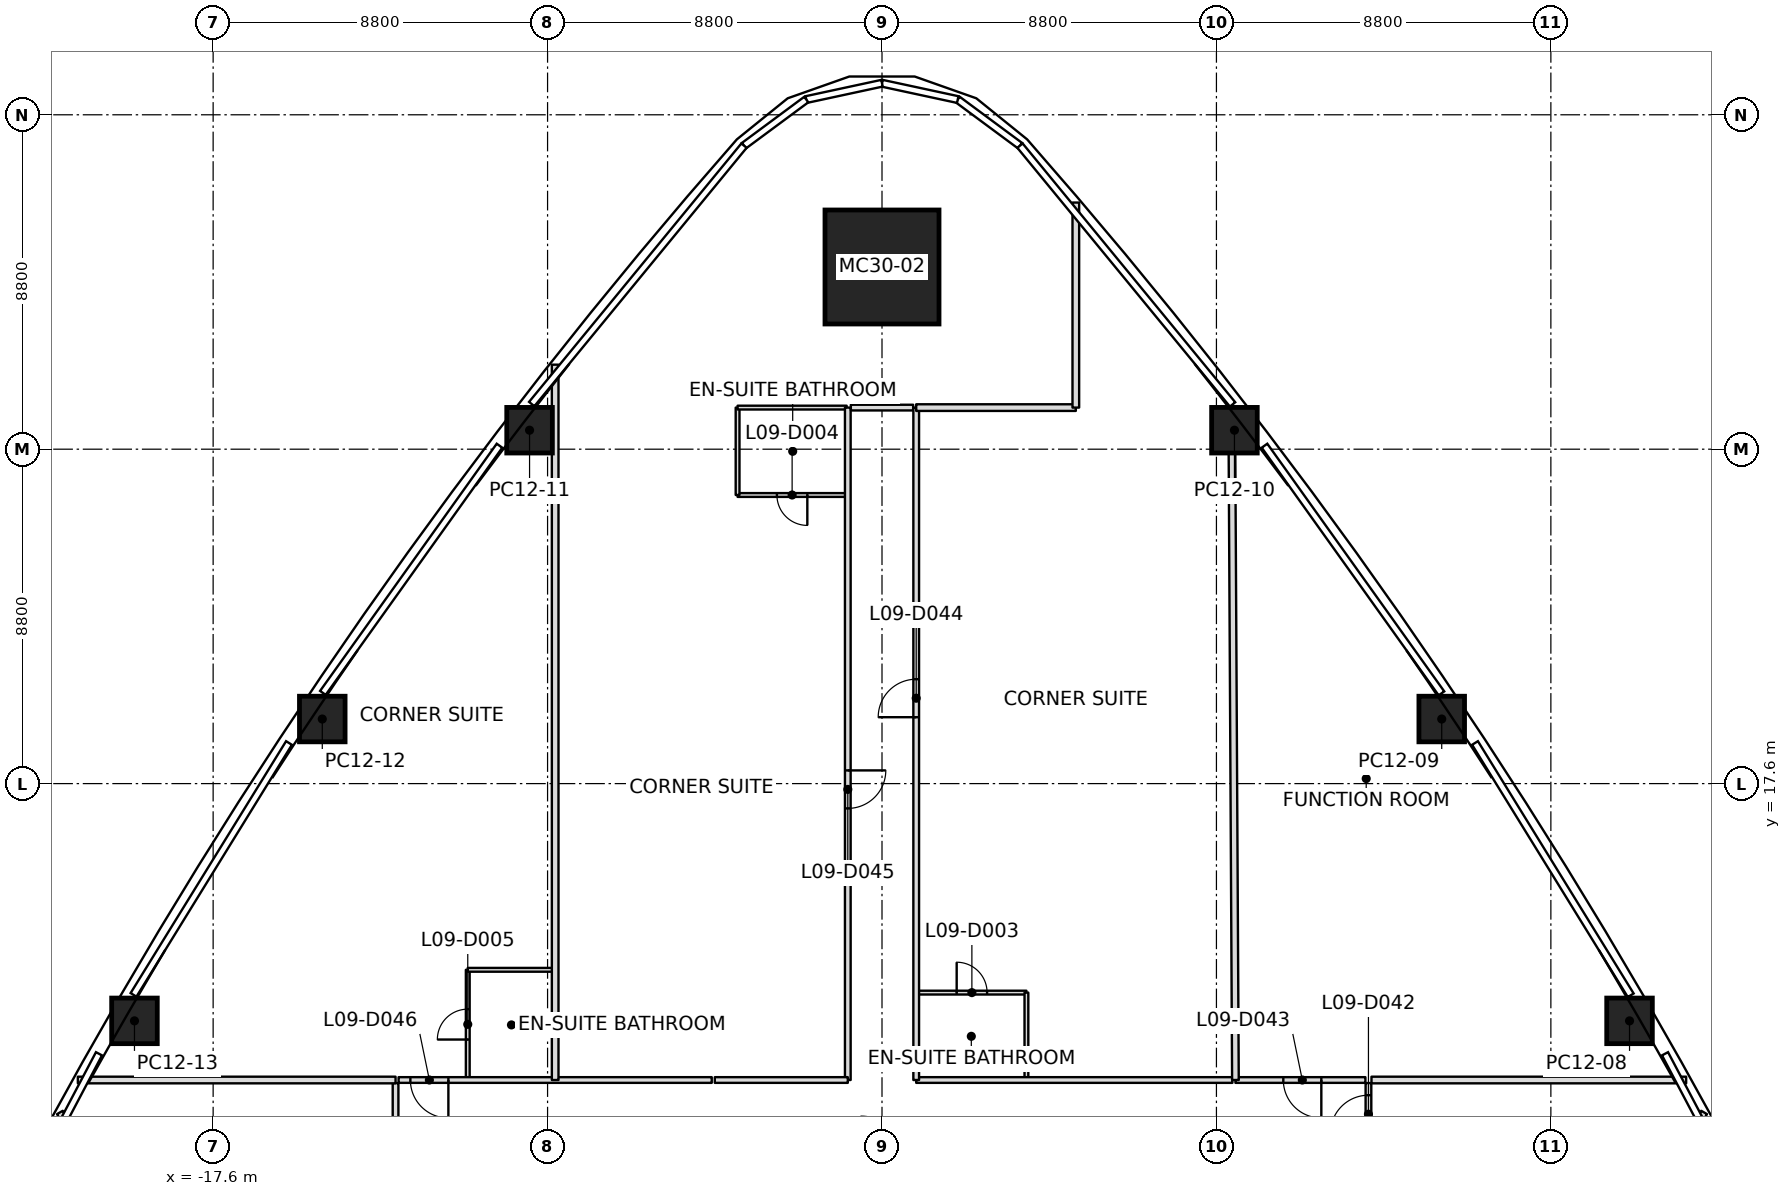
"""IFC4 building model, lengths in metres.
Left out: names, types, materials, properties, quantities, classifications, styles, units other than length and angle.
Written with IfcOpenShell. Run it as: python <this file> out.ifc"""

import sys

from ifc_helpers import new_model, si_unit, direction, frame, frame_2d, origin, origin_2d, place, context, subcontext, project, spatial, rectangle, extrude, element, fill, save


model = new_model("IFC4")
c1 = context("Model", 3, precision=1e-05, world=origin(), true_north=direction((0.0, 1.0)))
c2 = subcontext(c1, "Body", "Model", "MODEL_VIEW")
j1 = project(units=[si_unit("LENGTHUNIT", "METRE"), si_unit("PLANEANGLEUNIT", "RADIAN")], contexts=[c1])
p1 = place(None, origin())
s1 = spatial("IfcSite", under=j1, at=p1, CompositionType="ELEMENT")
p2 = place(p1, origin())
s2 = spatial("IfcBuilding", under=s1, at=p2, CompositionType="ELEMENT")
p3 = place(p2, frame((0.0, 0.0, 55.4)))
s3 = spatial("IfcBuildingStorey", under=s2, at=p3, CompositionType="ELEMENT", Elevation=55.4)
p4 = place(p3, frame((0.0, 31.195, 0.0), z_axis=(0.0, -0.035277579215, 0.999377552482), x_axis=(1.0, 0.0, 0.0)))
e1 = element("IfcColumn", 1, at=p4, inside=s3, PredefinedType="COLUMN", context=c2, shape_type="SweptSolid", body=[
    extrude(rectangle(XDim=3.0, YDim=3.0, at=origin_2d()), origin(), (0.0, 0.0, 1.0), 3.702),
])
p5 = place(p3, frame((19.67, 11.356, 0.0), z_axis=(-0.010688020009, -0.006201690622, 0.999923649716), x_axis=(-0.499971440741, 0.866041891424, 2.7221193e-05)))
e2 = element("IfcColumn", 2, at=p5, inside=s3, PredefinedType="COLUMN", context=c2, shape_type="SweptSolid", body=[
    extrude(rectangle(XDim=1.2, YDim=1.2, at=origin_2d()), origin(), (0.0, 0.0, 1.0), 3.7),
])
p6 = place(p3, frame((14.728, 19.299, 0.0), z_axis=(-0.005607671689, -0.014382028568, 0.999880848538), x_axis=(-0.555948898556, 0.831169491111, 0.008837377453)))
e3 = element("IfcColumn", 3, at=p6, inside=s3, PredefinedType="COLUMN", context=c2, shape_type="SweptSolid", body=[
    extrude(rectangle(XDim=1.2, YDim=1.2, at=origin_2d()), origin(), (0.0, 0.0, 1.0), 3.701),
])
for number, where, z_axis, x_axis in (
    (4, (9.274, 26.899, 0.0), (-0.0, -0.022, 1.0), (-0.61, 0.793, 0.018)),
    (5, (-9.274, 26.899, 0.0), (0.0, -0.022, 1.0), (0.61, 0.793, 0.018)),
):
    element("IfcColumn", number, at=place(p3, frame(where, z_axis=z_axis, x_axis=x_axis)), inside=s3, PredefinedType="COLUMN", context=c2, shape_type="SweptSolid", body=[
        extrude(rectangle(XDim=1.2, YDim=1.2, at=origin_2d()), origin(), (0.0, 0.0, 1.0), 3.701),
    ])
p7 = place(p3, frame((-14.728, 19.299, 0.0), z_axis=(0.005607671689, -0.014382028568, 0.999880848538), x_axis=(0.555948898556, 0.831169491111, 0.008837377453)))
e6 = element("IfcColumn", 6, at=p7, inside=s3, PredefinedType="COLUMN", context=c2, shape_type="SweptSolid", body=[
    extrude(rectangle(XDim=1.2, YDim=1.2, at=origin_2d()), origin(), (0.0, 0.0, 1.0), 3.701),
])
p8 = place(p3, frame((-19.67, 11.356, 0.0), z_axis=(0.010688020009, -0.006201690622, 0.999923649716), x_axis=(0.499971440741, 0.866041891424, 2.7221193e-05)))
e7 = element("IfcColumn", 7, at=p8, inside=s3, PredefinedType="COLUMN", context=c2, shape_type="SweptSolid", body=[
    extrude(rectangle(XDim=1.2, YDim=1.2, at=origin_2d()), origin(), (0.0, 0.0, 1.0), 3.7),
])
p9 = place(p3, frame((-21.632, 8.947, 0.0), z_axis=(0.0, 0.0, 1.0), x_axis=(0.499991586322, -0.866030261369, 0.0)))
e8 = element("IfcWall", 8, at=p9, inside=s3, PredefinedType="PARTITIONING", context=c2, shape_type="SweptSolid", body=[
    extrude(rectangle(XDim=3.115, YDim=0.175, at=frame_2d((1.557, 0.0))), origin(), (0.0, 0.0, 1.0), 2.784),
])
p10 = place(p3, frame((-12.8, 9.8, 0.0), z_axis=(0.0, 0.0, 1.0), x_axis=(-1.0, 0.0, 0.0)))
e9 = element("IfcWall", 9, at=p10, inside=s3, PredefinedType="PARTITIONING", context=c2, shape_type="SweptSolid", body=[
    extrude(rectangle(XDim=8.36, YDim=0.175, at=frame_2d((4.18, 0.0))), origin(), (0.0, 0.0, 1.0), 2.784),
])
p11 = place(p3, frame((-8.6, 9.8, 0.0), z_axis=(0.0, 0.0, 1.0), x_axis=(0.0, 1.0, 0.0)))
e10 = element("IfcWall", 10, at=p11, inside=s3, PredefinedType="PARTITIONING", context=c2, shape_type="SweptSolid", body=[
    extrude(rectangle(XDim=18.824, YDim=0.175, at=frame_2d((9.412, 0.0))), origin(), (0.0, 0.0, 1.0), 2.934),
])
p12 = place(p3, frame((0.9, 27.495, 0.0), z_axis=(0.0, 0.0, 1.0), x_axis=(1.0, 0.0, 0.0)))
e11 = element("IfcWall", 11, at=p12, inside=s3, PredefinedType="PARTITIONING", context=c2, shape_type="SweptSolid", body=[
    extrude(rectangle(XDim=4.2, YDim=0.175, at=frame_2d((2.1, 0.0))), origin(), (0.0, 0.0, 1.0), 3.0),
])
p13 = place(p3, frame((5.1, 27.495, 0.0), z_axis=(0.0, 0.0, 1.0), x_axis=(0.0, 1.0, 0.0)))
e12 = element("IfcWall", 12, at=p13, inside=s3, PredefinedType="PARTITIONING", context=c2, shape_type="SweptSolid", body=[
    extrude(rectangle(XDim=5.396, YDim=0.175, at=frame_2d((2.698, 0.0))), origin(), (0.0, 0.0, 1.0), 2.934),
])
p14 = place(p3, frame((9.203, 27.505, 0.0), z_axis=(0.0, 0.0, 1.0), x_axis=(0.005488058554, -0.999984940493, 0.0)))
e13 = element("IfcWall", 13, at=p14, inside=s3, PredefinedType="PARTITIONING", context=c2, shape_type="SweptSolid", body=[
    extrude(rectangle(XDim=17.705, YDim=0.175, at=frame_2d((8.853, 0.0))), origin(), (0.0, 0.0, 1.0), 2.947),
])
p15 = place(p3, frame((19.7, 5.6, 0.0), z_axis=(0.0, 0.0, 1.0), x_axis=(0.500059696094, 0.865990935485, 0.0)))
e14 = element("IfcWall", 14, at=p15, inside=s3, PredefinedType="PARTITIONING", context=c2, shape_type="SweptSolid", body=[
    extrude(rectangle(XDim=3.864, YDim=0.175, at=frame_2d((1.932, 0.0))), origin(), (0.0, 0.0, 1.0), 2.934),
])
p16 = place(p3, frame((12.88, 9.8, 0.0), z_axis=(0.0, 0.0, 1.0), x_axis=(1.0, 0.0, 0.0)))
e15 = element("IfcWall", 15, at=p16, inside=s3, PredefinedType="PARTITIONING", context=c2, shape_type="SweptSolid", body=[
    extrude(rectangle(XDim=8.28, YDim=0.175, at=frame_2d((4.14, 0.0))), origin(), (0.0, 0.0, 1.0), 2.934),
])
p17 = place(p3, frame((-12.8, 9.72, 0.0), z_axis=(0.0, 0.0, 1.0), x_axis=(0.0, -1.0, 0.0)))
e16 = element("IfcWall", 16, at=p17, inside=s3, PredefinedType="PARTITIONING", context=c2, shape_type="SweptSolid", body=[
    extrude(rectangle(XDim=16.071, YDim=0.15, at=frame_2d((8.035, 0.0))), origin(), (0.0, 0.0, 1.0), 2.867),
])
p18 = place(p17, frame((1.195, 0.0, 0.0)))
e17 = element("IfcOpeningElement", 17, at=p18, cuts=e16, PredefinedType="OPENING", context=c2, shape_type="SweptSolid", body=[
    extrude(rectangle(XDim=1.0, YDim=2.1, at=frame_2d((0.5, 1.05))), frame((0.0, 0.075, 0.0), z_axis=(0.0, -1.0, 0.0), x_axis=(1.0, 0.0, 0.0)), (0.0, 0.0, 1.0), 0.15),
])
p19 = place(p17, frame((10.471, 0.0, 0.0)))
e18 = element("IfcOpeningElement", 18, at=p19, cuts=e16, PredefinedType="OPENING", context=c2, shape_type="SweptSolid", body=[
    extrude(rectangle(XDim=1.0, YDim=2.1, at=frame_2d((0.5, 1.05))), frame((0.0, 0.075, 0.0), z_axis=(0.0, -1.0, 0.0), x_axis=(1.0, 0.0, 0.0)), (0.0, 0.0, 1.0), 0.15),
])
p20 = place(p3, frame((-4.48, 9.8, 0.0), z_axis=(0.0, 0.0, 1.0), x_axis=(-1.0, 0.0, 0.0)))
e19 = element("IfcWall", 19, at=p20, inside=s3, PredefinedType="PARTITIONING", context=c2, shape_type="SweptSolid", body=[
    extrude(rectangle(XDim=8.24, YDim=0.15, at=frame_2d((4.12, 0.0))), origin(), (0.0, 0.0, 1.0), 2.943),
])
p21 = place(p20, frame((6.93, 0.0, 0.0)))
e20 = element("IfcOpeningElement", 20, at=p21, cuts=e19, PredefinedType="OPENING", context=c2, shape_type="SweptSolid", body=[
    extrude(rectangle(XDim=1.0, YDim=2.1, at=frame_2d((0.5, 1.05))), frame((0.0, 0.075, 0.0), z_axis=(0.0, -1.0, 0.0), x_axis=(1.0, 0.0, 0.0)), (0.0, 0.0, 1.0), 0.15),
])
p22 = place(p3, frame((-0.9, 27.495, 0.0), z_axis=(0.0, 0.0, 1.0), x_axis=(0.0, -1.0, 0.0)))
e21 = element("IfcWall", 21, at=p22, inside=s3, PredefinedType="PARTITIONING", context=c2, shape_type="SweptSolid", body=[
    extrude(rectangle(XDim=17.695, YDim=0.15, at=frame_2d((8.847, 0.0))), origin(), (0.0, 0.0, 1.0), 2.947),
])
p23 = place(p22, frame((9.547, 0.0, 0.0)))
e22 = element("IfcOpeningElement", 22, at=p23, cuts=e21, PredefinedType="OPENING", context=c2, shape_type="SweptSolid", body=[
    extrude(rectangle(XDim=1.0, YDim=2.1, at=frame_2d((0.5, 1.05))), frame((0.0, 0.075, 0.0), z_axis=(0.0, -1.0, 0.0), x_axis=(1.0, 0.0, 0.0)), (0.0, 0.0, 1.0), 0.15),
])
p24 = place(p3, frame((-0.9, 9.8, 0.0), z_axis=(0.0, 0.0, 1.0), x_axis=(-1.0, 0.0, 0.0)))
e23 = element("IfcWall", 23, at=p24, inside=s3, PredefinedType="PARTITIONING", context=c2, shape_type="SweptSolid", body=[
    extrude(rectangle(XDim=3.5, YDim=0.15, at=frame_2d((1.75, 0.0))), origin(), (0.0, 0.0, 1.0), 2.947),
])
p25 = place(p3, frame((0.82, 27.495, 0.0), z_axis=(0.0, 0.0, 1.0), x_axis=(-1.0, 0.0, 0.0)))
e24 = element("IfcWall", 24, at=p25, inside=s3, PredefinedType="PARTITIONING", context=c2, shape_type="SweptSolid", body=[
    extrude(rectangle(XDim=1.64, YDim=0.15, at=frame_2d((0.82, 0.0))), origin(), (0.0, 0.0, 1.0), 2.797),
])
p26 = place(p3, frame((9.22, 9.8, 0.0), z_axis=(0.0, 0.0, 1.0), x_axis=(-1.0, 0.0, 0.0)))
e25 = element("IfcWall", 25, at=p26, inside=s3, PredefinedType="PARTITIONING", context=c2, shape_type="SweptSolid", body=[
    extrude(rectangle(XDim=8.32, YDim=0.15, at=frame_2d((4.16, 0.0))), origin(), (0.0, 0.0, 1.0), 2.947),
])
p27 = place(p3, frame((0.9, 9.8, 0.0), z_axis=(0.0, 0.0, 1.0), x_axis=(0.0, 1.0, 0.0)))
e26 = element("IfcWall", 26, at=p27, inside=s3, PredefinedType="PARTITIONING", context=c2, shape_type="SweptSolid", body=[
    extrude(rectangle(XDim=17.695, YDim=0.15, at=frame_2d((8.847, 0.0))), origin(), (0.0, 0.0, 1.0), 2.947),
])
p28 = place(p27, frame((9.547, 0.0, 0.0)))
e27 = element("IfcOpeningElement", 27, at=p28, cuts=e26, PredefinedType="OPENING", context=c2, shape_type="SweptSolid", body=[
    extrude(rectangle(XDim=1.0, YDim=2.1, at=frame_2d((0.5, 1.05))), frame((0.0, 0.075, 0.0), z_axis=(0.0, -1.0, 0.0), x_axis=(1.0, 0.0, 0.0)), (0.0, 0.0, 1.0), 0.15),
])
p29 = place(p3, frame((12.72, 9.8, 0.0), z_axis=(0.0, 0.0, 1.0), x_axis=(-1.0, 0.0, 0.0)))
e28 = element("IfcWall", 28, at=p29, inside=s3, PredefinedType="PARTITIONING", context=c2, shape_type="SweptSolid", body=[
    extrude(rectangle(XDim=3.42, YDim=0.15, at=frame_2d((1.71, 0.0))), origin(), (0.0, 0.0, 1.0), 3.0),
])
p30 = place(p29, frame((1.16, 0.0, 0.0)))
e29 = element("IfcOpeningElement", 29, at=p30, cuts=e28, PredefinedType="OPENING", context=c2, shape_type="SweptSolid", body=[
    extrude(rectangle(XDim=1.0, YDim=2.1, at=frame_2d((0.5, 1.05))), frame((0.0, 0.075, 0.0), z_axis=(0.0, -1.0, 0.0), x_axis=(1.0, 0.0, 0.0)), (0.0, 0.0, 1.0), 0.15),
])
p31 = place(p3, frame((12.8, -6.351, 0.0), z_axis=(0.0, 0.0, 1.0), x_axis=(0.0, 1.0, 0.0)))
e30 = element("IfcWall", 30, at=p31, inside=s3, PredefinedType="PARTITIONING", context=c2, shape_type="SweptSolid", body=[
    extrude(rectangle(XDim=16.071, YDim=0.15, at=frame_2d((8.035, 0.0))), origin(), (0.0, 0.0, 1.0), 3.0),
])
p32 = place(p31, frame((6.676, 0.0, 0.0)))
e31 = element("IfcOpeningElement", 31, at=p32, cuts=e30, PredefinedType="OPENING", context=c2, shape_type="SweptSolid", body=[
    extrude(rectangle(XDim=1.0, YDim=2.1, at=frame_2d((0.5, 1.05))), frame((0.0, 0.075, 0.0), z_axis=(0.0, -1.0, 0.0), x_axis=(1.0, 0.0, 0.0)), (0.0, 0.0, 1.0), 0.15),
])
p33 = place(p31, frame((14.751, 0.0, 0.0)))
e32 = element("IfcOpeningElement", 32, at=p33, cuts=e30, PredefinedType="OPENING", context=c2, shape_type="SweptSolid", body=[
    extrude(rectangle(XDim=1.0, YDim=2.1, at=frame_2d((0.5, 1.05))), frame((0.0, 0.075, 0.0), z_axis=(0.0, -1.0, 0.0), x_axis=(1.0, 0.0, 0.0)), (0.0, 0.0, 1.0), 0.15),
])
p34 = place(p3, frame((-10.9, 9.83, 0.0), z_axis=(0.0, 0.0, 1.0), x_axis=(0.0, 1.0, 0.0)))
e33 = element("IfcWall", 33, at=p34, inside=s3, PredefinedType="PARTITIONING", context=c2, shape_type="SweptSolid", body=[
    extrude(rectangle(XDim=2.87, YDim=0.1, at=frame_2d((1.435, 0.0))), origin(), (0.0, 0.0, 1.0), 2.943),
])
p35 = place(p34, frame((1.035, 0.0, 0.0)))
e34 = element("IfcOpeningElement", 34, at=p35, cuts=e33, PredefinedType="OPENING", context=c2, shape_type="SweptSolid", body=[
    extrude(rectangle(XDim=0.8, YDim=2.1, at=frame_2d((0.4, 1.05))), frame((0.0, 0.05, 0.0), z_axis=(0.0, -1.0, 0.0), x_axis=(1.0, 0.0, 0.0)), (0.0, 0.0, 1.0), 0.1),
])
p36 = place(p3, frame((-10.9, 12.7, 0.0), z_axis=(0.0, 0.0, 1.0), x_axis=(1.0, 0.0, 0.0)))
e35 = element("IfcWall", 35, at=p36, inside=s3, PredefinedType="PARTITIONING", context=c2, shape_type="SweptSolid", body=[
    extrude(rectangle(XDim=2.27, YDim=0.1, at=frame_2d((1.135, 0.0))), origin(), (0.0, 0.0, 1.0), 2.947),
])
p37 = place(p3, frame((-0.93, 25.195, 0.0), z_axis=(0.0, 0.0, 1.0), x_axis=(-1.0, 0.0, 0.0)))
e36 = element("IfcWall", 36, at=p37, inside=s3, PredefinedType="PARTITIONING", context=c2, shape_type="SweptSolid", body=[
    extrude(rectangle(XDim=2.87, YDim=0.1, at=frame_2d((1.435, 0.0))), origin(), (0.0, 0.0, 1.0), 3.0),
])
p38 = place(p37, frame((1.035, 0.0, 0.0)))
e37 = element("IfcOpeningElement", 37, at=p38, cuts=e36, PredefinedType="OPENING", context=c2, shape_type="SweptSolid", body=[
    extrude(rectangle(XDim=0.8, YDim=2.1, at=frame_2d((0.4, 1.05))), frame((0.0, 0.05, 0.0), z_axis=(0.0, -1.0, 0.0), x_axis=(1.0, 0.0, 0.0)), (0.0, 0.0, 1.0), 0.1),
])
p39 = place(p3, frame((-3.8, 25.195, 0.0), z_axis=(0.0, 0.0, 1.0), x_axis=(0.0, 1.0, 0.0)))
e38 = element("IfcWall", 38, at=p39, inside=s3, PredefinedType="PARTITIONING", context=c2, shape_type="SweptSolid", body=[
    extrude(rectangle(XDim=2.3, YDim=0.1, at=frame_2d((1.15, 0.0))), origin(), (0.0, 0.0, 1.0), 3.0),
])
p40 = place(p3, frame((-3.8, 27.495, 0.0), z_axis=(0.0, 0.0, 1.0), x_axis=(1.0, 0.0, 0.0)))
e39 = element("IfcWall", 39, at=p40, inside=s3, PredefinedType="PARTITIONING", context=c2, shape_type="SweptSolid", body=[
    extrude(rectangle(XDim=2.87, YDim=0.1, at=frame_2d((1.435, 0.0))), origin(), (0.0, 0.0, 1.0), 3.0),
])
p41 = place(p3, frame((0.93, 12.1, 0.0), z_axis=(0.0, 0.0, 1.0), x_axis=(1.0, 0.0, 0.0)))
e40 = element("IfcWall", 40, at=p41, inside=s3, PredefinedType="PARTITIONING", context=c2, shape_type="SweptSolid", body=[
    extrude(rectangle(XDim=2.87, YDim=0.1, at=frame_2d((1.435, 0.0))), origin(), (0.0, 0.0, 1.0), 3.0),
])
p42 = place(p41, frame((1.035, 0.0, 0.0)))
e41 = element("IfcOpeningElement", 41, at=p42, cuts=e40, PredefinedType="OPENING", context=c2, shape_type="SweptSolid", body=[
    extrude(rectangle(XDim=0.8, YDim=2.1, at=frame_2d((0.4, 1.05))), frame((0.0, 0.05, 0.0), z_axis=(0.0, -1.0, 0.0), x_axis=(1.0, 0.0, 0.0)), (0.0, 0.0, 1.0), 0.1),
])
p43 = place(p3, frame((3.8, 12.1, 0.0), z_axis=(0.0, 0.0, 1.0), x_axis=(0.0, -1.0, 0.0)))
e42 = element("IfcWall", 42, at=p43, inside=s3, PredefinedType="PARTITIONING", context=c2, shape_type="SweptSolid", body=[
    extrude(rectangle(XDim=2.27, YDim=0.1, at=frame_2d((1.135, 0.0))), origin(), (0.0, 0.0, 1.0), 3.0),
])
p44 = place(p33, origin())
e43 = element("IfcDoor", 43, at=p44, inside=s3, OperationType="SINGLE_SWING_LEFT", PredefinedType="DOOR", context=c2, shape_type="SweptSolid", body=[
    extrude(rectangle(XDim=1.0, YDim=2.1, at=frame_2d((0.5, 1.05))), frame((0.0, 0.025, 0.0), z_axis=(0.0, -1.0, 0.0), x_axis=(1.0, 0.0, 0.0)), (0.0, 0.0, 1.0), 0.05),
])
fill(e32, e43)
p45 = place(p30, origin())
e44 = element("IfcDoor", 44, at=p45, inside=s3, OperationType="SINGLE_SWING_LEFT", PredefinedType="DOOR", context=c2, shape_type="SweptSolid", body=[
    extrude(rectangle(XDim=1.0, YDim=2.1, at=frame_2d((0.5, 1.05))), frame((0.0, 0.025, 0.0), z_axis=(0.0, -1.0, 0.0), x_axis=(1.0, 0.0, 0.0)), (0.0, 0.0, 1.0), 0.05),
])
fill(e29, e44)
p46 = place(p28, origin())
e45 = element("IfcDoor", 45, at=p46, inside=s3, OperationType="SINGLE_SWING_RIGHT", PredefinedType="DOOR", context=c2, shape_type="SweptSolid", body=[
    extrude(rectangle(XDim=1.0, YDim=2.1, at=frame_2d((0.5, 1.05))), frame((0.0, 0.025, 0.0), z_axis=(0.0, -1.0, 0.0), x_axis=(1.0, 0.0, 0.0)), (0.0, 0.0, 1.0), 0.05),
])
fill(e27, e45)
p47 = place(p42, origin())
e46 = element("IfcDoor", 46, at=p47, inside=s3, OperationType="SINGLE_SWING_LEFT", PredefinedType="DOOR", context=c2, shape_type="SweptSolid", body=[
    extrude(rectangle(XDim=0.8, YDim=2.1, at=frame_2d((0.4, 1.05))), frame((0.0, 0.025, 0.0), z_axis=(0.0, -1.0, 0.0), x_axis=(1.0, 0.0, 0.0)), (0.0, 0.0, 1.0), 0.05),
])
fill(e41, e46)
p48 = place(p23, origin())
e47 = element("IfcDoor", 47, at=p48, inside=s3, OperationType="SINGLE_SWING_LEFT", PredefinedType="DOOR", context=c2, shape_type="SweptSolid", body=[
    extrude(rectangle(XDim=1.0, YDim=2.1, at=frame_2d((0.5, 1.05))), frame((0.0, 0.025, 0.0), z_axis=(0.0, -1.0, 0.0), x_axis=(1.0, 0.0, 0.0)), (0.0, 0.0, 1.0), 0.05),
])
fill(e22, e47)
p49 = place(p38, origin())
e48 = element("IfcDoor", 48, at=p49, inside=s3, OperationType="SINGLE_SWING_LEFT", PredefinedType="DOOR", context=c2, shape_type="SweptSolid", body=[
    extrude(rectangle(XDim=0.8, YDim=2.1, at=frame_2d((0.4, 1.05))), frame((0.0, 0.025, 0.0), z_axis=(0.0, -1.0, 0.0), x_axis=(1.0, 0.0, 0.0)), (0.0, 0.0, 1.0), 0.05),
])
fill(e37, e48)
p50 = place(p21, origin())
e49 = element("IfcDoor", 49, at=p50, inside=s3, OperationType="SINGLE_SWING_RIGHT", PredefinedType="DOOR", context=c2, shape_type="SweptSolid", body=[
    extrude(rectangle(XDim=1.0, YDim=2.1, at=frame_2d((0.5, 1.05))), frame((0.0, 0.025, 0.0), z_axis=(0.0, -1.0, 0.0), x_axis=(1.0, 0.0, 0.0)), (0.0, 0.0, 1.0), 0.05),
])
fill(e20, e49)
p51 = place(p35, origin())
e50 = element("IfcDoor", 50, at=p51, inside=s3, OperationType="SINGLE_SWING_RIGHT", PredefinedType="DOOR", context=c2, shape_type="SweptSolid", body=[
    extrude(rectangle(XDim=0.8, YDim=2.1, at=frame_2d((0.4, 1.05))), frame((0.0, 0.025, 0.0), z_axis=(0.0, -1.0, 0.0), x_axis=(1.0, 0.0, 0.0)), (0.0, 0.0, 1.0), 0.05),
])
fill(e34, e50)
save(model, sys.argv[1])
